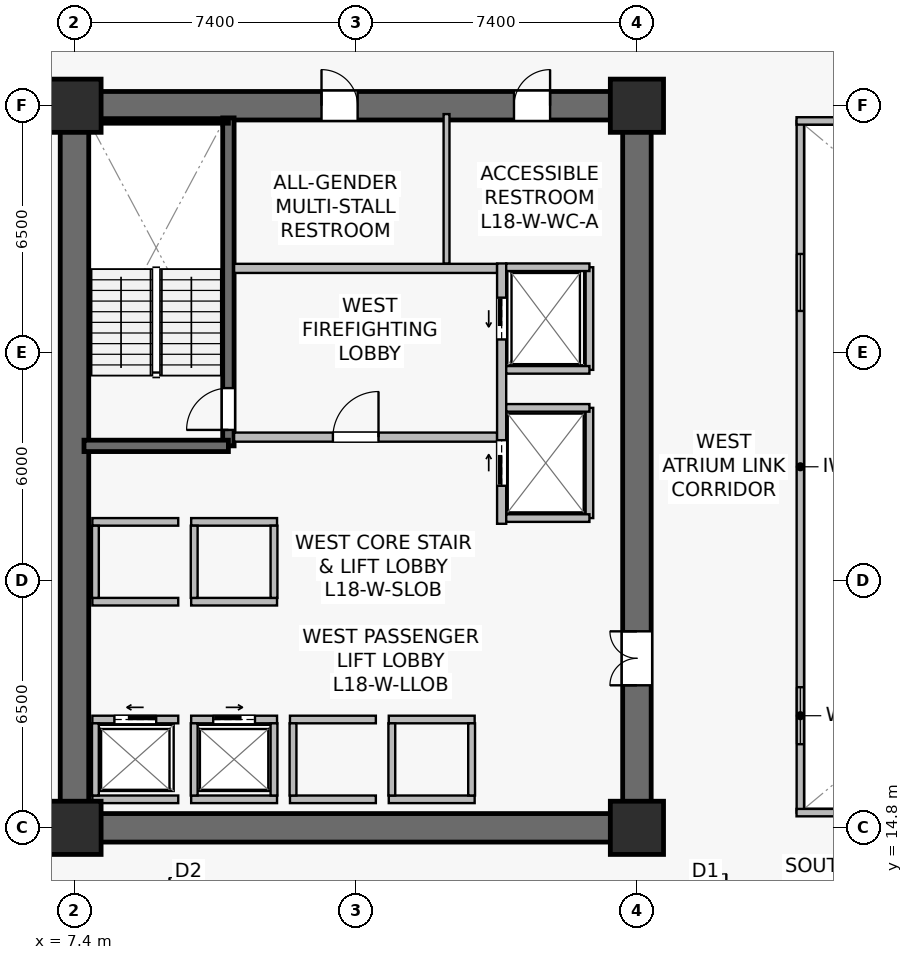
"""IFC4 building model, lengths in metres.
Left out: names, types, materials, properties, quantities, classifications, styles, units other than length and angle.
Written with IfcOpenShell. Run it as: python <this file> out.ifc"""

import sys

from ifc_helpers import new_model, si_unit, direction, frame, frame_2d, origin, origin_2d, place, context, subcontext, project, spatial, rectangle, extrude, source, transform, mapped, element, fill, save


model = new_model("IFC4")
c1 = context("Model", 3, precision=1e-05, world=origin(), true_north=direction((0.0, 1.0)))
c2 = subcontext(c1, "Body", "Model", "MODEL_VIEW")
j1 = project(units=[si_unit("LENGTHUNIT", "METRE"), si_unit("PLANEANGLEUNIT", "RADIAN")], contexts=[c1])
p1 = place(None, origin())
s1 = spatial("IfcSite", under=j1, at=p1, CompositionType="ELEMENT")
p2 = place(p1, origin())
s2 = spatial("IfcBuilding", under=s1, at=p2, CompositionType="ELEMENT")
p3 = place(p2, frame((0.0, 0.0, 74.4)))
s3 = spatial("IfcBuildingStorey", under=s2, at=p3, CompositionType="ELEMENT", Elevation=74.4)
p4 = place(p3, frame((7.025, 14.8, 0.0), z_axis=(0.0, 0.0, 1.0), x_axis=(1.0, 0.0, 0.0)))
e1 = element("IfcWall", 1, at=p4, inside=s3, PredefinedType="SHEAR", context=c2, shape_type="SweptSolid", body=[
    extrude(rectangle(XDim=15.55, YDim=0.75, at=frame_2d((7.775, 0.0))), origin(), (0.0, 0.0, 1.0), 3.78),
])
p5 = place(p3, frame((7.025, 33.8, 0.0), z_axis=(0.0, 0.0, 1.0), x_axis=(1.0, 0.0, 0.0)))
e2 = element("IfcWall", 2, at=p5, inside=s3, PredefinedType="SHEAR", context=c2, shape_type="SweptSolid", body=[
    extrude(rectangle(XDim=15.55, YDim=0.75, at=frame_2d((7.775, 0.0))), origin(), (0.0, 0.0, 1.0), 3.78),
])
p6 = place(p5, frame((6.875, 0.0, 0.0)))
e3 = element("IfcOpeningElement", 3, at=p6, cuts=e2, PredefinedType="OPENING", context=c2, shape_type="SweptSolid", body=[
    extrude(rectangle(XDim=0.95, YDim=2.15, at=frame_2d((0.475, 1.075))), frame((0.0, 0.385, 0.0), z_axis=(0.0, -1.0, 0.0), x_axis=(1.0, 0.0, 0.0)), (0.0, 0.0, 1.0), 0.77),
])
p7 = place(p5, frame((11.94, 0.0, 0.0)))
e4 = element("IfcOpeningElement", 4, at=p7, cuts=e2, PredefinedType="OPENING", context=c2, shape_type="SweptSolid", body=[
    extrude(rectangle(XDim=0.95, YDim=2.15, at=frame_2d((0.475, 1.075))), frame((0.0, 0.385, 0.0), z_axis=(0.0, -1.0, 0.0), x_axis=(1.0, 0.0, 0.0)), (0.0, 0.0, 1.0), 0.77),
])
p8 = place(p3, frame((7.4, 15.175, 0.0), z_axis=(0.0, 0.0, 1.0), x_axis=(0.0, 1.0, 0.0)))
e5 = element("IfcWall", 5, at=p8, inside=s3, PredefinedType="SHEAR", context=c2, shape_type="SweptSolid", body=[
    extrude(rectangle(XDim=18.25, YDim=0.75, at=frame_2d((9.125, 0.0))), origin(), (0.0, 0.0, 1.0), 3.78),
])
p9 = place(p3, frame((22.2, 15.175, 0.0), z_axis=(0.0, 0.0, 1.0), x_axis=(0.0, 1.0, 0.0)))
e6 = element("IfcWall", 6, at=p9, inside=s3, PredefinedType="SHEAR", context=c2, shape_type="SweptSolid", body=[
    extrude(rectangle(XDim=18.25, YDim=0.75, at=frame_2d((9.125, 0.0))), origin(), (0.0, 0.0, 1.0), 3.78),
])
p10 = place(p9, frame((3.375, 0.0, 0.0)))
e7 = element("IfcOpeningElement", 7, at=p10, cuts=e6, PredefinedType="OPENING", context=c2, shape_type="SweptSolid", body=[
    extrude(rectangle(XDim=1.42, YDim=2.2, at=frame_2d((0.71, 1.1))), frame((0.0, 0.385, 0.0), z_axis=(0.0, -1.0, 0.0), x_axis=(1.0, 0.0, 0.0)), (0.0, 0.0, 1.0), 0.77),
])
p11 = place(p3, frame((11.45, 24.85, 0.0), z_axis=(0.0, 0.0, 1.0), x_axis=(0.0, 1.0, 0.0)))
e8 = element("IfcWall", 8, at=p11, inside=s3, PredefinedType="SHEAR", context=c2, shape_type="SweptSolid", body=[
    extrude(rectangle(XDim=8.63, YDim=0.3, at=frame_2d((4.315, 0.0))), origin(), (0.0, 0.0, 1.0), 3.78),
])
p12 = place(p11, frame((0.42, 0.0, 0.0)))
e9 = element("IfcOpeningElement", 9, at=p12, cuts=e8, PredefinedType="OPENING", context=c2, shape_type="SweptSolid", body=[
    extrude(rectangle(XDim=1.1, YDim=2.15, at=frame_2d((0.55, 1.075))), frame((0.0, 0.16, 0.0), z_axis=(0.0, -1.0, 0.0), x_axis=(1.0, 0.0, 0.0)), (0.0, 0.0, 1.0), 0.32),
])
p13 = place(p3, frame((7.65, 24.85, 0.0), z_axis=(0.0, 0.0, 1.0), x_axis=(1.0, 0.0, 0.0)))
e10 = element("IfcWall", 10, at=p13, inside=s3, PredefinedType="SHEAR", context=c2, shape_type="SweptSolid", body=[
    extrude(rectangle(XDim=3.8, YDim=0.3, at=frame_2d((1.9, 0.0))), origin(), (0.0, 0.0, 1.0), 3.78),
])
p14 = place(p3, frame((7.73, 33.4, 0.0), z_axis=(0.0, 0.0, 1.0), x_axis=(1.0, 0.0, 0.0)))
e11 = element("IfcWall", 11, at=p14, inside=s3, PredefinedType="SOLIDWALL", context=c2, shape_type="SweptSolid", body=[
    extrude(rectangle(XDim=3.72, YDim=0.12, at=frame_2d((1.86, 0.0))), origin(), (0.0, 0.0, 1.0), 3.78),
])
m1 = source(origin(), c2, "Body", "SweptSolid", [
    extrude(rectangle(XDim=1.4, YDim=1.4, at=origin_2d()), origin(), (0.0, 0.0, 1.0), 4.1),
])
for number, where, z_axis, x_axis in (
    (12, (7.4, 14.8, 0.0), (0.0, 0.0, 1.0), (1.0, 0.0, 0.0)),
    (13, (22.2, 14.8, 0.0), (0.0, 0.0, 1.0), (1.0, 0.0, 0.0)),
    (14, (7.4, 33.8, 0.0), (0.0, 0.0, 1.0), (1.0, 0.0, 0.0)),
    (15, (22.2, 33.8, 0.0), (0.0, 0.0, 1.0), (1.0, 0.0, 0.0)),
):
    element("IfcColumn", number, at=place(p3, frame(where, z_axis=z_axis, x_axis=x_axis)), inside=s3, PredefinedType="COLUMN", context=c2, shape_type="MappedRepresentation", body=[
        mapped(m1, transform((0.0, 0.0, 0.0), scale=1.0)),
    ])
p15 = place(p3, frame((11.6, 25.08, 0.0), z_axis=(0.0, 0.0, 1.0), x_axis=(1.0, 0.0, 0.0)))
e16 = element("IfcWall", 16, at=p15, inside=s3, PredefinedType="SOLIDWALL", context=c2, shape_type="SweptSolid", body=[
    extrude(rectangle(XDim=6.92, YDim=0.24, at=frame_2d((3.46, 0.0))), origin(), (0.0, 0.0, 1.0), 3.115),
])
p16 = place(p15, frame((2.6, 0.0, 0.0)))
e17 = element("IfcOpeningElement", 17, at=p16, cuts=e16, PredefinedType="OPENING", context=c2, shape_type="SweptSolid", body=[
    extrude(rectangle(XDim=1.2, YDim=2.16, at=frame_2d((0.6, 1.08))), frame((0.0, 0.13, 0.0), z_axis=(0.0, -1.0, 0.0), x_axis=(1.0, 0.0, 0.0)), (0.0, 0.0, 1.0), 0.26),
])
p17 = place(p3, frame((11.6, 29.52, 0.0), z_axis=(0.0, 0.0, 1.0), x_axis=(1.0, 0.0, 0.0)))
e18 = element("IfcWall", 18, at=p17, inside=s3, PredefinedType="SOLIDWALL", context=c2, shape_type="SweptSolid", body=[
    extrude(rectangle(XDim=6.92, YDim=0.24, at=frame_2d((3.46, 0.0))), origin(), (0.0, 0.0, 1.0), 3.115),
])
p18 = place(p3, frame((18.64, 22.8, 0.0), z_axis=(0.0, 0.0, 1.0), x_axis=(0.0, 1.0, 0.0)))
e19 = element("IfcWall", 19, at=p18, inside=s3, PredefinedType="SOLIDWALL", context=c2, shape_type="SweptSolid", body=[
    extrude(rectangle(XDim=6.85, YDim=0.24, at=frame_2d((3.425, 0.0))), origin(), (0.0, 0.0, 1.0), 2.865),
])
p19 = place(p18, frame((4.85, 0.0, 0.0)))
e20 = element("IfcOpeningElement", 20, at=p19, cuts=e19, PredefinedType="OPENING", context=c2, shape_type="SweptSolid", body=[
    extrude(rectangle(XDim=1.1, YDim=2.22, at=frame_2d((0.55, 1.11))), frame((0.0, 0.13, 0.0), z_axis=(0.0, -1.0, 0.0), x_axis=(1.0, 0.0, 0.0)), (0.0, 0.0, 1.0), 0.26),
])
p20 = place(p18, frame((1.0, 0.0, 0.0)))
e21 = element("IfcOpeningElement", 21, at=p20, cuts=e19, PredefinedType="OPENING", context=c2, shape_type="SweptSolid", body=[
    extrude(rectangle(XDim=1.2, YDim=2.22, at=frame_2d((0.6, 1.11))), frame((0.0, 0.13, 0.0), z_axis=(0.0, -1.0, 0.0), x_axis=(1.0, 0.0, 0.0)), (0.0, 0.0, 1.0), 0.26),
])
p21 = place(p3, frame((7.87, 17.65, 0.0), z_axis=(0.0, 0.0, 1.0), x_axis=(1.0, 0.0, 0.0)))
e22 = element("IfcWall", 22, at=p21, inside=s3, PredefinedType="SOLIDWALL", context=c2, shape_type="SweptSolid", body=[
    extrude(rectangle(XDim=2.26, YDim=0.2, at=frame_2d((1.13, 0.0))), origin(), (0.0, 0.0, 1.0), 3.78),
])
p22 = place(p21, frame((0.58, 0.0, 0.0)))
e23 = element("IfcOpeningElement", 23, at=p22, cuts=e22, PredefinedType="OPENING", context=c2, shape_type="SweptSolid", body=[
    extrude(rectangle(XDim=1.1, YDim=2.22, at=frame_2d((0.55, 1.11))), frame((0.0, 0.11, 0.0), z_axis=(0.0, -1.0, 0.0), x_axis=(1.0, 0.0, 0.0)), (0.0, 0.0, 1.0), 0.22),
])
p23 = place(p3, frame((7.87, 15.55, 0.0), z_axis=(0.0, 0.0, 1.0), x_axis=(1.0, 0.0, 0.0)))
e24 = element("IfcWall", 24, at=p23, inside=s3, PredefinedType="SOLIDWALL", context=c2, shape_type="SweptSolid", body=[
    extrude(rectangle(XDim=2.26, YDim=0.2, at=frame_2d((1.13, 0.0))), origin(), (0.0, 0.0, 1.0), 3.78),
])
p24 = place(p3, frame((7.95, 15.65, 0.0), z_axis=(0.0, 0.0, 1.0), x_axis=(0.0, 1.0, 0.0)))
e25 = element("IfcWall", 25, at=p24, inside=s3, PredefinedType="SOLIDWALL", context=c2, shape_type="SweptSolid", body=[
    extrude(rectangle(XDim=1.9, YDim=0.18, at=frame_2d((0.95, 0.0))), origin(), (0.0, 0.0, 1.0), 3.78),
])
p25 = place(p3, frame((10.47, 17.65, 0.0), z_axis=(0.0, 0.0, 1.0), x_axis=(1.0, 0.0, 0.0)))
e26 = element("IfcWall", 26, at=p25, inside=s3, PredefinedType="SOLIDWALL", context=c2, shape_type="SweptSolid", body=[
    extrude(rectangle(XDim=2.26, YDim=0.2, at=frame_2d((1.13, 0.0))), origin(), (0.0, 0.0, 1.0), 3.78),
])
p26 = place(p25, frame((0.58, 0.0, 0.0)))
e27 = element("IfcOpeningElement", 27, at=p26, cuts=e26, PredefinedType="OPENING", context=c2, shape_type="SweptSolid", body=[
    extrude(rectangle(XDim=1.1, YDim=2.22, at=frame_2d((0.55, 1.11))), frame((0.0, 0.11, 0.0), z_axis=(0.0, -1.0, 0.0), x_axis=(1.0, 0.0, 0.0)), (0.0, 0.0, 1.0), 0.22),
])
p27 = place(p3, frame((10.47, 15.55, 0.0), z_axis=(0.0, 0.0, 1.0), x_axis=(1.0, 0.0, 0.0)))
e28 = element("IfcWall", 28, at=p27, inside=s3, PredefinedType="SOLIDWALL", context=c2, shape_type="SweptSolid", body=[
    extrude(rectangle(XDim=2.26, YDim=0.2, at=frame_2d((1.13, 0.0))), origin(), (0.0, 0.0, 1.0), 3.78),
])
for number, where, z_axis, x_axis in (
    (29, (10.55, 15.65, 0.0), (0.0, 0.0, 1.0), (0.0, 1.0, 0.0)),
    (30, (12.65, 15.65, 0.0), (0.0, 0.0, 1.0), (0.0, 1.0, 0.0)),
):
    element("IfcWall", number, at=place(p3, frame(where, z_axis=z_axis, x_axis=x_axis)), inside=s3, PredefinedType="SOLIDWALL", context=c2, shape_type="SweptSolid", body=[
        extrude(rectangle(XDim=1.9, YDim=0.18, at=frame_2d((0.95, 0.0))), origin(), (0.0, 0.0, 1.0), 3.78),
    ])
for number, where, z_axis, x_axis in (
    (31, (13.07, 17.65, 0.0), (0.0, 0.0, 1.0), (1.0, 0.0, 0.0)),
    (32, (13.07, 15.55, 0.0), (0.0, 0.0, 1.0), (1.0, 0.0, 0.0)),
):
    element("IfcWall", number, at=place(p3, frame(where, z_axis=z_axis, x_axis=x_axis)), inside=s3, PredefinedType="SOLIDWALL", context=c2, shape_type="SweptSolid", body=[
        extrude(rectangle(XDim=2.26, YDim=0.2, at=frame_2d((1.13, 0.0))), origin(), (0.0, 0.0, 1.0), 3.115),
    ])
p28 = place(p3, frame((13.15, 15.65, 0.0), z_axis=(0.0, 0.0, 1.0), x_axis=(0.0, 1.0, 0.0)))
e33 = element("IfcWall", 33, at=p28, inside=s3, PredefinedType="SOLIDWALL", context=c2, shape_type="SweptSolid", body=[
    extrude(rectangle(XDim=1.9, YDim=0.18, at=frame_2d((0.95, 0.0))), origin(), (0.0, 0.0, 1.0), 3.78),
])
for number, where, z_axis, x_axis in (
    (34, (15.67, 17.65, 0.0), (0.0, 0.0, 1.0), (1.0, 0.0, 0.0)),
    (35, (15.67, 15.55, 0.0), (0.0, 0.0, 1.0), (1.0, 0.0, 0.0)),
):
    element("IfcWall", number, at=place(p3, frame(where, z_axis=z_axis, x_axis=x_axis)), inside=s3, PredefinedType="SOLIDWALL", context=c2, shape_type="SweptSolid", body=[
        extrude(rectangle(XDim=2.26, YDim=0.2, at=frame_2d((1.13, 0.0))), origin(), (0.0, 0.0, 1.0), 3.78),
    ])
for number, where, z_axis, x_axis in (
    (36, (15.75, 15.65, 0.0), (0.0, 0.0, 1.0), (0.0, 1.0, 0.0)),
    (37, (17.85, 15.65, 0.0), (0.0, 0.0, 1.0), (0.0, 1.0, 0.0)),
):
    element("IfcWall", number, at=place(p3, frame(where, z_axis=z_axis, x_axis=x_axis)), inside=s3, PredefinedType="SOLIDWALL", context=c2, shape_type="SweptSolid", body=[
        extrude(rectangle(XDim=1.9, YDim=0.18, at=frame_2d((0.95, 0.0))), origin(), (0.0, 0.0, 1.0), 3.78),
    ])
for number, where, z_axis, x_axis in (
    (38, (7.87, 20.75, 0.0), (0.0, 0.0, 1.0), (1.0, 0.0, 0.0)),
    (39, (7.87, 22.85, 0.0), (0.0, 0.0, 1.0), (1.0, 0.0, 0.0)),
):
    element("IfcWall", number, at=place(p3, frame(where, z_axis=z_axis, x_axis=x_axis)), inside=s3, PredefinedType="SOLIDWALL", context=c2, shape_type="SweptSolid", body=[
        extrude(rectangle(XDim=2.26, YDim=0.2, at=frame_2d((1.13, 0.0))), origin(), (0.0, 0.0, 1.0), 3.78),
    ])
p29 = place(p3, frame((7.95, 20.85, 0.0), z_axis=(0.0, 0.0, 1.0), x_axis=(0.0, 1.0, 0.0)))
e40 = element("IfcWall", 40, at=p29, inside=s3, PredefinedType="SOLIDWALL", context=c2, shape_type="SweptSolid", body=[
    extrude(rectangle(XDim=1.9, YDim=0.18, at=frame_2d((0.95, 0.0))), origin(), (0.0, 0.0, 1.0), 3.78),
])
for number, where, z_axis, x_axis in (
    (41, (10.47, 20.75, 0.0), (0.0, 0.0, 1.0), (1.0, 0.0, 0.0)),
    (42, (10.47, 22.85, 0.0), (0.0, 0.0, 1.0), (1.0, 0.0, 0.0)),
):
    element("IfcWall", number, at=place(p3, frame(where, z_axis=z_axis, x_axis=x_axis)), inside=s3, PredefinedType="SOLIDWALL", context=c2, shape_type="SweptSolid", body=[
        extrude(rectangle(XDim=2.26, YDim=0.2, at=frame_2d((1.13, 0.0))), origin(), (0.0, 0.0, 1.0), 3.78),
    ])
for number, where, z_axis, x_axis in (
    (43, (10.55, 20.85, 0.0), (0.0, 0.0, 1.0), (0.0, 1.0, 0.0)),
    (44, (12.65, 20.85, 0.0), (0.0, 0.0, 1.0), (0.0, 1.0, 0.0)),
):
    element("IfcWall", number, at=place(p3, frame(where, z_axis=z_axis, x_axis=x_axis)), inside=s3, PredefinedType="SOLIDWALL", context=c2, shape_type="SweptSolid", body=[
        extrude(rectangle(XDim=1.9, YDim=0.18, at=frame_2d((0.95, 0.0))), origin(), (0.0, 0.0, 1.0), 3.78),
    ])
p30 = place(p3, frame((20.95, 26.85, 0.0), z_axis=(0.0, 0.0, 1.0), x_axis=(0.0, 1.0, 0.0)))
e45 = element("IfcWall", 45, at=p30, inside=s3, PredefinedType="SOLIDWALL", context=c2, shape_type="SweptSolid", body=[
    extrude(rectangle(XDim=2.7, YDim=0.2, at=frame_2d((1.35, 0.0))), origin(), (0.0, 0.0, 1.0), 3.78),
])
p31 = place(p3, frame((18.76, 29.55, 0.0), z_axis=(0.0, 0.0, 1.0), x_axis=(1.0, 0.0, 0.0)))
e46 = element("IfcWall", 46, at=p31, inside=s3, PredefinedType="SOLIDWALL", context=c2, shape_type="SweptSolid", body=[
    extrude(rectangle(XDim=2.19, YDim=0.2, at=frame_2d((1.095, 0.0))), origin(), (0.0, 0.0, 1.0), 3.78),
])
p32 = place(p3, frame((18.76, 26.85, 0.0), z_axis=(0.0, 0.0, 1.0), x_axis=(1.0, 0.0, 0.0)))
e47 = element("IfcWall", 47, at=p32, inside=s3, PredefinedType="SOLIDWALL", context=c2, shape_type="SweptSolid", body=[
    extrude(rectangle(XDim=2.19, YDim=0.2, at=frame_2d((1.095, 0.0))), origin(), (0.0, 0.0, 1.0), 3.177),
])
p33 = place(p3, frame((20.95, 22.95, 0.0), z_axis=(0.0, 0.0, 1.0), x_axis=(0.0, 1.0, 0.0)))
e48 = element("IfcWall", 48, at=p33, inside=s3, PredefinedType="SOLIDWALL", context=c2, shape_type="SweptSolid", body=[
    extrude(rectangle(XDim=2.9, YDim=0.2, at=frame_2d((1.45, 0.0))), origin(), (0.0, 0.0, 1.0), 2.865),
])
for number, where, z_axis, x_axis in (
    (49, (18.76, 25.85, 0.0), (0.0, 0.0, 1.0), (1.0, 0.0, 0.0)),
    (50, (18.76, 22.95, 0.0), (0.0, 0.0, 1.0), (1.0, 0.0, 0.0)),
):
    element("IfcWall", number, at=place(p3, frame(where, z_axis=z_axis, x_axis=x_axis)), inside=s3, PredefinedType="SOLIDWALL", context=c2, shape_type="SweptSolid", body=[
        extrude(rectangle(XDim=2.19, YDim=0.2, at=frame_2d((1.095, 0.0))), origin(), (0.0, 0.0, 1.0), 3.78),
    ])
p34 = place(p3, frame((17.19, 29.65, 0.0), z_axis=(0.0, 0.0, 1.0), x_axis=(0.0, 1.0, 0.0)))
e51 = element("IfcWall", 51, at=p34, inside=s3, PredefinedType="PLUMBINGWALL", context=c2, shape_type="SweptSolid", body=[
    extrude(rectangle(XDim=3.93, YDim=0.155, at=frame_2d((1.965, 0.0))), origin(), (0.0, 0.0, 1.0), 3.78),
])
p35 = place(p3, frame((26.5, 15.2, 0.0), z_axis=(0.0, 0.0, 1.0), x_axis=(0.0, 1.0, 0.0)))
e52 = element("IfcWall", 52, at=p35, inside=s3, PredefinedType="SOLIDWALL", context=c2, shape_type="SweptSolid", body=[
    extrude(rectangle(XDim=18.2, YDim=0.195, at=frame_2d((9.1, 0.0))), origin(), (0.0, 0.0, 1.0), 3.78),
])
p36 = place(p35, frame((1.8, 0.0, 0.9)))
e53 = element("IfcOpeningElement", 53, at=p36, cuts=e52, PredefinedType="OPENING", context=c2, shape_type="SweptSolid", body=[
    extrude(rectangle(XDim=1.5, YDim=1.4, at=frame_2d((0.75, 0.7))), frame((0.0, 0.107, 0.0), z_axis=(0.0, -1.0, 0.0), x_axis=(1.0, 0.0, 0.0)), (0.0, 0.0, 1.0), 0.215),
])
p37 = place(p35, frame((13.2, 0.0, 0.9)))
e54 = element("IfcOpeningElement", 54, at=p37, cuts=e52, PredefinedType="OPENING", context=c2, shape_type="SweptSolid", body=[
    extrude(rectangle(XDim=1.5, YDim=1.4, at=frame_2d((0.75, 0.7))), frame((0.0, 0.107, 0.0), z_axis=(0.0, -1.0, 0.0), x_axis=(1.0, 0.0, 0.0)), (0.0, 0.0, 1.0), 0.215),
])
for number, where, z_axis, x_axis in (
    (55, (26.4, 15.2, 0.0), (0.0, 0.0, 1.0), (1.0, 0.0, 0.0)),
    (56, (26.4, 33.4, 0.0), (0.0, 0.0, 1.0), (1.0, 0.0, 0.0)),
):
    element("IfcWall", number, at=place(p3, frame(where, z_axis=z_axis, x_axis=x_axis)), inside=s3, PredefinedType="SOLIDWALL", context=c2, shape_type="SweptSolid", body=[
        extrude(rectangle(XDim=22.0, YDim=0.195, at=frame_2d((11.0, 0.0))), origin(), (0.0, 0.0, 1.0), 3.78),
    ])
m2 = source(origin(), c2, "Body", "SweptSolid", [
    extrude(rectangle(XDim=1.5, YDim=1.4, at=frame_2d((0.75, 0.7))), frame((0.0, 0.03, 0.0), z_axis=(0.0, -1.0, 0.0), x_axis=(1.0, 0.0, 0.0)), (0.0, 0.0, 1.0), 0.06),
])
p38 = place(p36, origin())
e57 = element("IfcWindow", 57, at=p38, inside=s3, PartitioningType="SINGLE_PANEL", PredefinedType="WINDOW", context=c2, shape_type="MappedRepresentation", body=[
    mapped(m2, transform((0.0, 0.0, 0.0), scale=1.0)),
])
fill(e53, e57)
p39 = place(p37, origin())
e58 = element("IfcWindow", 58, at=p39, inside=s3, PartitioningType="SINGLE_PANEL", PredefinedType="WINDOW", context=c2, shape_type="MappedRepresentation", body=[
    mapped(m2, transform((0.0, 0.0, 0.0), scale=1.0)),
])
fill(e54, e58)
m3 = source(origin(), c2, "Body", "SweptSolid", [
    extrude(rectangle(XDim=1.1, YDim=2.15, at=frame_2d((0.55, 1.075))), frame((0.0, 0.025, 0.0), z_axis=(0.0, -1.0, 0.0), x_axis=(1.0, 0.0, 0.0)), (0.0, 0.0, 1.0), 0.05),
])
p40 = place(p12, origin())
e59 = element("IfcDoor", 59, at=p40, inside=s3, OperationType="SINGLE_SWING_LEFT", PredefinedType="DOOR", context=c2, shape_type="MappedRepresentation", body=[
    mapped(m3, transform((0.0, 0.0, 0.0), scale=1.0)),
])
fill(e9, e59)
m4 = source(origin(), c2, "Body", "SweptSolid", [
    extrude(rectangle(XDim=1.2, YDim=2.16, at=frame_2d((0.6, 1.08))), frame((0.0, 0.025, 0.0), z_axis=(0.0, -1.0, 0.0), x_axis=(1.0, 0.0, 0.0)), (0.0, 0.0, 1.0), 0.05),
])
p41 = place(p16, origin())
e60 = element("IfcDoor", 60, at=p41, inside=s3, OperationType="SINGLE_SWING_RIGHT", PredefinedType="DOOR", context=c2, shape_type="MappedRepresentation", body=[
    mapped(m4, transform((0.0, 0.0, 0.0), scale=1.0)),
])
fill(e17, e60)
m5 = source(origin(), c2, "Body", "SweptSolid", [
    extrude(rectangle(XDim=1.1, YDim=2.22, at=frame_2d((0.55, 1.11))), frame((0.0, 0.025, 0.0), z_axis=(0.0, -1.0, 0.0), x_axis=(1.0, 0.0, 0.0)), (0.0, 0.0, 1.0), 0.05),
])
p42 = place(p22, origin())
e61 = element("IfcDoor", 61, at=p42, inside=s3, OperationType="SLIDING_TO_LEFT", PredefinedType="USERDEFINED", context=c2, shape_type="MappedRepresentation", body=[
    mapped(m5, transform((0.0, 0.0, 0.0), scale=1.0)),
])
fill(e23, e61)
p43 = place(p26, origin())
e62 = element("IfcDoor", 62, at=p43, inside=s3, OperationType="SLIDING_TO_RIGHT", PredefinedType="USERDEFINED", context=c2, shape_type="MappedRepresentation", body=[
    mapped(m5, transform((0.0, 0.0, 0.0), scale=1.0)),
])
fill(e27, e62)
p44 = place(p19, origin())
e63 = element("IfcDoor", 63, at=p44, inside=s3, OperationType="SLIDING_TO_LEFT", PredefinedType="USERDEFINED", context=c2, shape_type="MappedRepresentation", body=[
    mapped(m5, transform((0.0, 0.0, 0.0), scale=1.0)),
])
fill(e20, e63)
m6 = source(origin(), c2, "Body", "SweptSolid", [
    extrude(rectangle(XDim=1.2, YDim=2.22, at=frame_2d((0.6, 1.11))), frame((0.0, 0.025, 0.0), z_axis=(0.0, -1.0, 0.0), x_axis=(1.0, 0.0, 0.0)), (0.0, 0.0, 1.0), 0.05),
])
p45 = place(p20, origin())
e64 = element("IfcDoor", 64, at=p45, inside=s3, OperationType="SLIDING_TO_RIGHT", PredefinedType="USERDEFINED", context=c2, shape_type="MappedRepresentation", body=[
    mapped(m6, transform((0.0, 0.0, 0.0), scale=1.0)),
])
fill(e21, e64)
m7 = source(origin(), c2, "Body", "SweptSolid", [
    extrude(rectangle(XDim=1.42, YDim=2.2, at=frame_2d((0.71, 1.1))), frame((0.0, 0.025, 0.0), z_axis=(0.0, -1.0, 0.0), x_axis=(1.0, 0.0, 0.0)), (0.0, 0.0, 1.0), 0.05),
])
p46 = place(p10, origin())
e65 = element("IfcDoor", 65, at=p46, inside=s3, OperationType="DOUBLE_DOOR_SINGLE_SWING", PredefinedType="DOOR", context=c2, shape_type="MappedRepresentation", body=[
    mapped(m7, transform((0.0, 0.0, 0.0), scale=1.0)),
])
fill(e7, e65)
m8 = source(origin(), c2, "Body", "SweptSolid", [
    extrude(rectangle(XDim=0.95, YDim=2.15, at=frame_2d((0.475, 1.075))), frame((0.0, 0.025, 0.0), z_axis=(0.0, -1.0, 0.0), x_axis=(1.0, 0.0, 0.0)), (0.0, 0.0, 1.0), 0.05),
])
p47 = place(p6, origin())
e66 = element("IfcDoor", 66, at=p47, inside=s3, OperationType="SINGLE_SWING_LEFT", PredefinedType="DOOR", context=c2, shape_type="MappedRepresentation", body=[
    mapped(m8, transform((0.0, 0.0, 0.0), scale=1.0)),
])
fill(e3, e66)
p48 = place(p7, origin())
e67 = element("IfcDoor", 67, at=p48, inside=s3, OperationType="SINGLE_SWING_RIGHT", PredefinedType="DOOR", context=c2, shape_type="MappedRepresentation", body=[
    mapped(m8, transform((0.0, 0.0, 0.0), scale=1.0)),
])
fill(e4, e67)
save(model, sys.argv[1])
